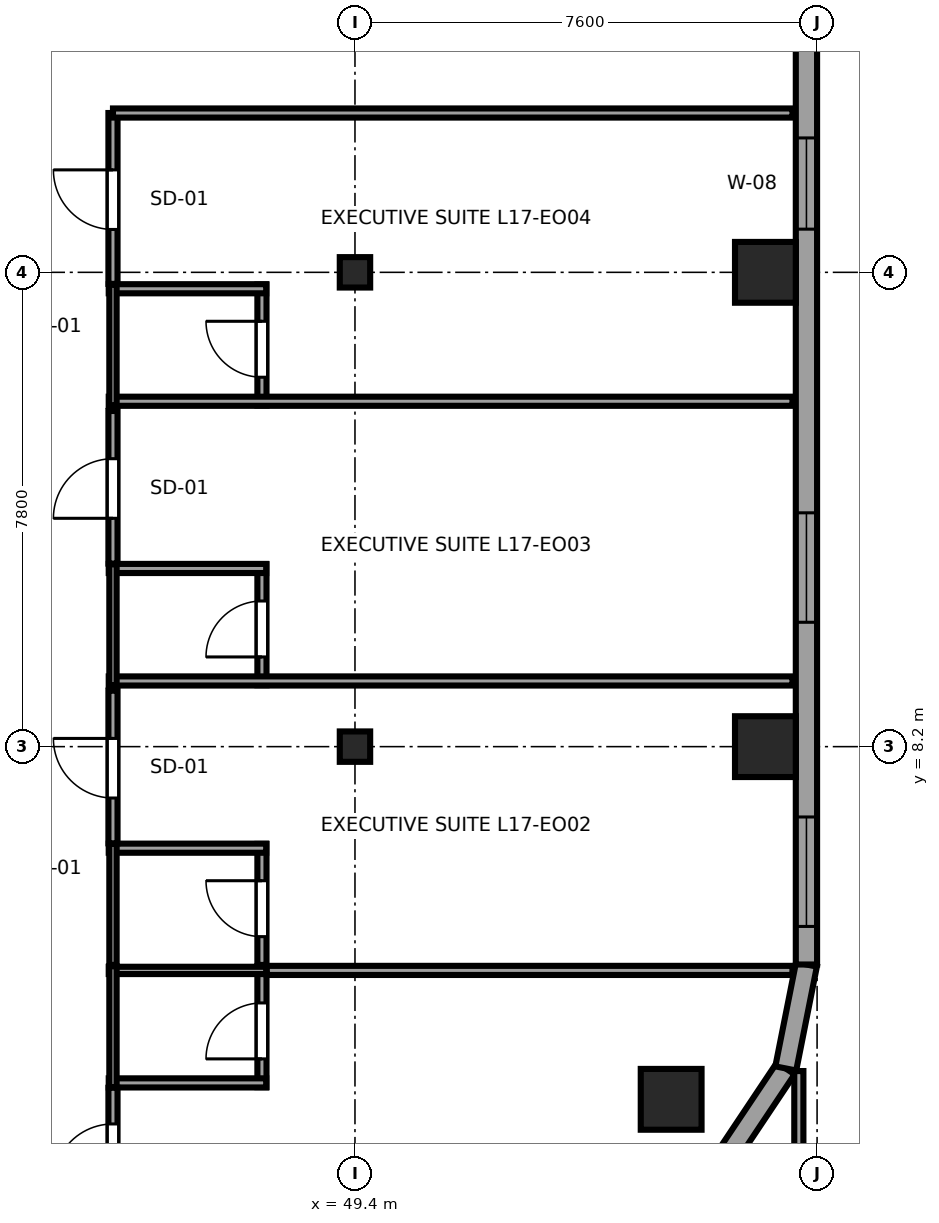
"""IFC4 building model, lengths in metres.
Left out: names, types, materials, properties, quantities, classifications, styles, units other than length and angle.
Written with IfcOpenShell. Run it as: python <this file> out.ifc"""

import sys

from ifc_helpers import new_model, si_unit, direction, frame, frame_2d, origin, origin_2d, place, context, subcontext, project, spatial, rectangle, i_section, extrude, source, transform, mapped, element, fill, save


model = new_model("IFC4")
c1 = context("Model", 3, precision=1e-05, world=origin(), true_north=direction((0.0, 1.0)))
c2 = subcontext(c1, "Body", "Model", "MODEL_VIEW")
j1 = project(units=[si_unit("LENGTHUNIT", "METRE"), si_unit("PLANEANGLEUNIT", "RADIAN")], contexts=[c1])
p1 = place(None, origin())
s1 = spatial("IfcSite", under=j1, at=p1, CompositionType="ELEMENT")
p2 = place(p1, origin())
s2 = spatial("IfcBuilding", under=s1, at=p2, CompositionType="ELEMENT")
p3 = place(p2, frame((0.0, 0.0, 71.05)))
s3 = spatial("IfcBuildingStorey", under=s2, at=p3, CompositionType="ELEMENT", Elevation=71.05)
m1 = source(origin(), c2, "Body", "SweptSolid", [
    extrude(i_section(OverallWidth=0.5, OverallDepth=0.5, WebThickness=0.028, FlangeThickness=0.045, at=origin_2d()), origin(), (0.0, 0.0, 1.0), 3.55),
])
for number, where, z_axis, x_axis in (
    (1, (49.4, 8.2, 0.0), (0.0, 0.0, 1.0), (1.0, 0.0, 0.0)),
    (2, (49.4, 16.0, 0.0), (0.0, 0.0, 1.0), (1.0, 0.0, 0.0)),
):
    element("IfcColumn", number, at=place(p3, frame(where, z_axis=z_axis, x_axis=x_axis)), inside=s3, PredefinedType="COLUMN", context=c2, shape_type="MappedRepresentation", body=[
        mapped(m1, transform((0.0, 0.0, 0.0), x_axis=(1.0, 0.0, 0.0), y_axis=(0.0, 1.0, 0.0), z_axis=(0.0, 0.0, 1.0), scale=1.0)),
    ])
m2 = source(origin(), c2, "Body", "SweptSolid", [
    extrude(rectangle(XDim=1.0, YDim=1.0, at=origin_2d()), origin(), (0.0, 0.0, 1.0), 3.55),
])
for number, where, z_axis, x_axis in (
    (3, (54.6, 2.4, 0.0), (0.0, 0.0, 1.0), (1.0, 0.0, 0.0)),
    (4, (56.15, 8.2, 0.0), (0.0, 0.0, 1.0), (1.0, 0.0, 0.0)),
    (5, (56.15, 16.0, 0.0), (0.0, 0.0, 1.0), (1.0, 0.0, 0.0)),
):
    element("IfcColumn", number, at=place(p3, frame(where, z_axis=z_axis, x_axis=x_axis)), inside=s3, PredefinedType="COLUMN", context=c2, shape_type="MappedRepresentation", body=[
        mapped(m2, transform((0.0, 0.0, 0.0), x_axis=(1.0, 0.0, 0.0), y_axis=(0.0, 1.0, 0.0), z_axis=(0.0, 0.0, 1.0), scale=1.0)),
    ])
p4 = place(p3, frame((55.527, 1.473, 0.0), z_axis=(0.0, 0.0, 1.0), x_axis=(0.55554893791, 0.831483840845, 0.0)))
e6 = element("IfcWall", 6, at=p4, inside=s3, PredefinedType="SOLIDWALL", context=c2, shape_type="SweptSolid", body=[
    extrude(rectangle(XDim=1.725, YDim=0.35, at=frame_2d((0.863, 0.0))), origin(), (0.0, 0.0, 1.0), 2.832),
])
p5 = place(p3, frame((56.485, 2.908, 0.0), z_axis=(0.0, 0.0, 1.0), x_axis=(0.195011420161, 0.980800971659, 0.0)))
e7 = element("IfcWall", 7, at=p5, inside=s3, PredefinedType="SOLIDWALL", context=c2, shape_type="SweptSolid", body=[
    extrude(rectangle(XDim=1.743, YDim=0.35, at=frame_2d((0.871, 0.0))), origin(), (0.0, 0.0, 1.0), 3.37),
])
p6 = place(p3, frame((56.825, 4.617, 0.0), z_axis=(0.0, 0.0, 1.0), x_axis=(0.0, 1.0, 0.0)))
e8 = element("IfcWall", 8, at=p6, inside=s3, PredefinedType="SOLIDWALL", context=c2, shape_type="SweptSolid", body=[
    extrude(rectangle(XDim=36.766, YDim=0.35, at=frame_2d((18.383, 0.0))), origin(), (0.0, 0.0, 1.0), 3.37),
])
p7 = place(p6, frame((0.626, 0.0, 0.68)))
e9 = element("IfcOpeningElement", 9, at=p7, cuts=e8, PredefinedType="OPENING", context=c2, shape_type="SweptSolid", body=[
    extrude(rectangle(XDim=1.8, YDim=1.85, at=frame_2d((0.9, 0.925))), frame((0.0, 0.185, 0.0), z_axis=(0.0, -1.0, 0.0), x_axis=(1.0, 0.0, 0.0)), (0.0, 0.0, 1.0), 0.37),
])
p8 = place(p6, frame((5.628, 0.0, 0.68)))
e10 = element("IfcOpeningElement", 10, at=p8, cuts=e8, PredefinedType="OPENING", context=c2, shape_type="SweptSolid", body=[
    extrude(rectangle(XDim=1.8, YDim=1.85, at=frame_2d((0.9, 0.925))), frame((0.0, 0.185, 0.0), z_axis=(0.0, -1.0, 0.0), x_axis=(1.0, 0.0, 0.0)), (0.0, 0.0, 1.0), 0.37),
])
p9 = place(p6, frame((16.933, 0.0, 0.68)))
e11 = element("IfcOpeningElement", 11, at=p9, cuts=e8, PredefinedType="OPENING", context=c2, shape_type="SweptSolid", body=[
    extrude(rectangle(XDim=1.8, YDim=1.85, at=frame_2d((0.9, 0.925))), frame((0.0, 0.185, 0.0), z_axis=(0.0, -1.0, 0.0), x_axis=(1.0, 0.0, 0.0)), (0.0, 0.0, 1.0), 0.37),
])
p10 = place(p6, frame((25.386, 0.0, 0.68)))
e12 = element("IfcOpeningElement", 12, at=p10, cuts=e8, PredefinedType="OPENING", context=c2, shape_type="SweptSolid", body=[
    extrude(rectangle(XDim=1.8, YDim=1.85, at=frame_2d((0.9, 0.925))), frame((0.0, 0.185, 0.0), z_axis=(0.0, -1.0, 0.0), x_axis=(1.0, 0.0, 0.0)), (0.0, 0.0, 1.0), 0.37),
])
p11 = place(p6, frame((30.388, 0.0, 0.68)))
e13 = element("IfcOpeningElement", 13, at=p11, cuts=e8, PredefinedType="OPENING", context=c2, shape_type="SweptSolid", body=[
    extrude(rectangle(XDim=1.8, YDim=1.85, at=frame_2d((0.9, 0.925))), frame((0.0, 0.185, 0.0), z_axis=(0.0, -1.0, 0.0), x_axis=(1.0, 0.0, 0.0)), (0.0, 0.0, 1.0), 0.37),
])
p12 = place(p6, frame((33.29, 0.0, 0.68)))
e14 = element("IfcOpeningElement", 14, at=p12, cuts=e8, PredefinedType="OPENING", context=c2, shape_type="SweptSolid", body=[
    extrude(rectangle(XDim=1.8, YDim=1.85, at=frame_2d((0.9, 0.925))), frame((0.0, 0.185, 0.0), z_axis=(0.0, -1.0, 0.0), x_axis=(1.0, 0.0, 0.0)), (0.0, 0.0, 1.0), 0.37),
])
p13 = place(p6, frame((12.093, 0.0, 0.62)))
e15 = element("IfcOpeningElement", 15, at=p13, cuts=e8, PredefinedType="OPENING", context=c2, shape_type="SweptSolid", body=[
    extrude(rectangle(XDim=1.5, YDim=1.55, at=frame_2d((0.75, 0.775))), frame((0.0, 0.185, 0.0), z_axis=(0.0, -1.0, 0.0), x_axis=(1.0, 0.0, 0.0)), (0.0, 0.0, 1.0), 0.37),
])
p14 = place(p3, frame((47.87, 2.6, 0.0), z_axis=(0.0, 0.0, 1.0), x_axis=(0.0, 1.0, 0.0)))
e16 = element("IfcWall", 16, at=p14, inside=s3, PredefinedType="PARTITIONING", context=c2, shape_type="SweptSolid", body=[
    extrude(rectangle(XDim=1.99, YDim=0.15, at=frame_2d((0.995, 0.0))), origin(), (0.0, 0.0, 1.0), 3.37),
])
p15 = place(p14, frame((0.465, 0.0, 0.0)))
e17 = element("IfcOpeningElement", 17, at=p15, cuts=e16, PredefinedType="OPENING", context=c2, shape_type="SweptSolid", body=[
    extrude(rectangle(XDim=0.92, YDim=2.01, at=frame_2d((0.46, 1.005))), frame((0.0, 0.085, 0.0), z_axis=(0.0, -1.0, 0.0), x_axis=(1.0, 0.0, 0.0)), (0.0, 0.0, 1.0), 0.17),
])
p16 = place(p3, frame((45.35, 2.67, 0.0), z_axis=(0.0, 0.0, 1.0), x_axis=(1.0, 0.0, 0.0)))
e18 = element("IfcWall", 18, at=p16, inside=s3, PredefinedType="PARTITIONING", context=c2, shape_type="SweptSolid", body=[
    extrude(rectangle(XDim=2.59, YDim=0.15, at=frame_2d((1.295, 0.0))), origin(), (0.0, 0.0, 1.0), 3.37),
])
p17 = place(p3, frame((45.35, 4.52, 0.0), z_axis=(0.0, 0.0, 1.0), x_axis=(1.0, 0.0, 0.0)))
e19 = element("IfcWall", 19, at=p17, inside=s3, PredefinedType="PLUMBINGWALL", context=c2, shape_type="SweptSolid", body=[
    extrude(rectangle(XDim=2.59, YDim=0.12, at=frame_2d((1.295, 0.0))), origin(), (0.0, 0.0, 1.0), 3.37),
])
p18 = place(p3, frame((45.42, 2.6, 0.0), z_axis=(0.0, 0.0, 1.0), x_axis=(0.0, 1.0, 0.0)))
e20 = element("IfcWall", 20, at=p18, inside=s3, PredefinedType="PLUMBINGWALL", context=c2, shape_type="SweptSolid", body=[
    extrude(rectangle(XDim=1.99, YDim=0.12, at=frame_2d((0.995, 0.0))), origin(), (0.0, 0.0, 1.0), 3.37),
])
p19 = place(p3, frame((47.87, 4.61, 0.0), z_axis=(0.0, 0.0, 1.0), x_axis=(0.0, 1.0, 0.0)))
e21 = element("IfcWall", 21, at=p19, inside=s3, PredefinedType="PARTITIONING", context=c2, shape_type="SweptSolid", body=[
    extrude(rectangle(XDim=1.99, YDim=0.15, at=frame_2d((0.995, 0.0))), origin(), (0.0, 0.0, 1.0), 3.37),
])
p20 = place(p19, frame((0.465, 0.0, 0.0)))
e22 = element("IfcOpeningElement", 22, at=p20, cuts=e21, PredefinedType="OPENING", context=c2, shape_type="SweptSolid", body=[
    extrude(rectangle(XDim=0.92, YDim=2.01, at=frame_2d((0.46, 1.005))), frame((0.0, 0.085, 0.0), z_axis=(0.0, -1.0, 0.0), x_axis=(1.0, 0.0, 0.0)), (0.0, 0.0, 1.0), 0.17),
])
p21 = place(p3, frame((45.35, 6.53, 0.0), z_axis=(0.0, 0.0, 1.0), x_axis=(1.0, 0.0, 0.0)))
e23 = element("IfcWall", 23, at=p21, inside=s3, PredefinedType="PARTITIONING", context=c2, shape_type="SweptSolid", body=[
    extrude(rectangle(XDim=2.59, YDim=0.15, at=frame_2d((1.295, 0.0))), origin(), (0.0, 0.0, 1.0), 3.37),
])
p22 = place(p3, frame((45.42, 4.61, 0.0), z_axis=(0.0, 0.0, 1.0), x_axis=(0.0, 1.0, 0.0)))
e24 = element("IfcWall", 24, at=p22, inside=s3, PredefinedType="PLUMBINGWALL", context=c2, shape_type="SweptSolid", body=[
    extrude(rectangle(XDim=1.99, YDim=0.12, at=frame_2d((0.995, 0.0))), origin(), (0.0, 0.0, 1.0), 3.37),
])
p23 = place(p3, frame((47.87, 9.21, 0.0), z_axis=(0.0, 0.0, 1.0), x_axis=(0.0, 1.0, 0.0)))
e25 = element("IfcWall", 25, at=p23, inside=s3, PredefinedType="PARTITIONING", context=c2, shape_type="SweptSolid", body=[
    extrude(rectangle(XDim=1.99, YDim=0.15, at=frame_2d((0.995, 0.0))), origin(), (0.0, 0.0, 1.0), 3.37),
])
p24 = place(p23, frame((0.465, 0.0, 0.0)))
e26 = element("IfcOpeningElement", 26, at=p24, cuts=e25, PredefinedType="OPENING", context=c2, shape_type="SweptSolid", body=[
    extrude(rectangle(XDim=0.92, YDim=2.01, at=frame_2d((0.46, 1.005))), frame((0.0, 0.085, 0.0), z_axis=(0.0, -1.0, 0.0), x_axis=(1.0, 0.0, 0.0)), (0.0, 0.0, 1.0), 0.17),
])
p25 = place(p3, frame((45.35, 9.28, 0.0), z_axis=(0.0, 0.0, 1.0), x_axis=(1.0, 0.0, 0.0)))
e27 = element("IfcWall", 27, at=p25, inside=s3, PredefinedType="PARTITIONING", context=c2, shape_type="SweptSolid", body=[
    extrude(rectangle(XDim=11.245, YDim=0.15, at=frame_2d((5.623, 0.0))), origin(), (0.0, 0.0, 1.0), 3.37),
])
p26 = place(p3, frame((45.35, 11.13, 0.0), z_axis=(0.0, 0.0, 1.0), x_axis=(1.0, 0.0, 0.0)))
e28 = element("IfcWall", 28, at=p26, inside=s3, PredefinedType="PARTITIONING", context=c2, shape_type="SweptSolid", body=[
    extrude(rectangle(XDim=2.59, YDim=0.15, at=frame_2d((1.295, 0.0))), origin(), (0.0, 0.0, 1.0), 3.37),
])
p27 = place(p3, frame((45.42, 9.21, 0.0), z_axis=(0.0, 0.0, 1.0), x_axis=(0.0, 1.0, 0.0)))
e29 = element("IfcWall", 29, at=p27, inside=s3, PredefinedType="PLUMBINGWALL", context=c2, shape_type="SweptSolid", body=[
    extrude(rectangle(XDim=1.99, YDim=0.12, at=frame_2d((0.995, 0.0))), origin(), (0.0, 0.0, 1.0), 3.37),
])
p28 = place(p3, frame((47.87, 13.81, 0.0), z_axis=(0.0, 0.0, 1.0), x_axis=(0.0, 1.0, 0.0)))
e30 = element("IfcWall", 30, at=p28, inside=s3, PredefinedType="PARTITIONING", context=c2, shape_type="SweptSolid", body=[
    extrude(rectangle(XDim=1.99, YDim=0.15, at=frame_2d((0.995, 0.0))), origin(), (0.0, 0.0, 1.0), 3.37),
])
p29 = place(p28, frame((0.465, 0.0, 0.0)))
e31 = element("IfcOpeningElement", 31, at=p29, cuts=e30, PredefinedType="OPENING", context=c2, shape_type="SweptSolid", body=[
    extrude(rectangle(XDim=0.92, YDim=2.01, at=frame_2d((0.46, 1.005))), frame((0.0, 0.085, 0.0), z_axis=(0.0, -1.0, 0.0), x_axis=(1.0, 0.0, 0.0)), (0.0, 0.0, 1.0), 0.17),
])
p30 = place(p3, frame((45.35, 13.88, 0.0), z_axis=(0.0, 0.0, 1.0), x_axis=(1.0, 0.0, 0.0)))
e32 = element("IfcWall", 32, at=p30, inside=s3, PredefinedType="PARTITIONING", context=c2, shape_type="SweptSolid", body=[
    extrude(rectangle(XDim=11.245, YDim=0.15, at=frame_2d((5.623, 0.0))), origin(), (0.0, 0.0, 1.0), 3.37),
])
p31 = place(p3, frame((45.35, 15.73, 0.0), z_axis=(0.0, 0.0, 1.0), x_axis=(1.0, 0.0, 0.0)))
e33 = element("IfcWall", 33, at=p31, inside=s3, PredefinedType="PARTITIONING", context=c2, shape_type="SweptSolid", body=[
    extrude(rectangle(XDim=2.59, YDim=0.15, at=frame_2d((1.295, 0.0))), origin(), (0.0, 0.0, 1.0), 3.37),
])
p32 = place(p3, frame((45.42, 13.81, 0.0), z_axis=(0.0, 0.0, 1.0), x_axis=(0.0, 1.0, 0.0)))
e34 = element("IfcWall", 34, at=p32, inside=s3, PredefinedType="PLUMBINGWALL", context=c2, shape_type="SweptSolid", body=[
    extrude(rectangle(XDim=1.99, YDim=0.12, at=frame_2d((0.995, 0.0))), origin(), (0.0, 0.0, 1.0), 3.37),
])
p33 = place(p3, frame((45.42, 0.405, 0.0), z_axis=(0.0, 0.0, 1.0), x_axis=(0.0, 1.0, 0.0)))
e35 = element("IfcWall", 35, at=p33, inside=s3, PredefinedType="PARTITIONING", context=c2, shape_type="SweptSolid", body=[
    extrude(rectangle(XDim=2.185, YDim=0.15, at=frame_2d((1.093, 0.0))), origin(), (0.0, 0.0, 1.0), 3.37),
])
p34 = place(p33, frame((0.61, 0.0, 0.0)))
e36 = element("IfcOpeningElement", 36, at=p34, cuts=e35, PredefinedType="OPENING", context=c2, shape_type="SweptSolid", body=[
    extrude(rectangle(XDim=0.98, YDim=2.12, at=frame_2d((0.49, 1.06))), frame((0.0, 0.085, 0.0), z_axis=(0.0, -1.0, 0.0), x_axis=(1.0, 0.0, 0.0)), (0.0, 0.0, 1.0), 0.17),
])
p35 = place(p3, frame((56.7, 0.48, 0.0), z_axis=(0.0, 0.0, 1.0), x_axis=(0.0, 1.0, 0.0)))
e37 = element("IfcWall", 37, at=p35, inside=s3, PredefinedType="PARTITIONING", context=c2, shape_type="SweptSolid", body=[
    extrude(rectangle(XDim=2.385, YDim=0.15, at=frame_2d((1.192, 0.0))), origin(), (0.0, 0.0, 1.0), 3.37),
])
p36 = place(p3, frame((47.95, 4.52, 0.0), z_axis=(0.0, 0.0, 1.0), x_axis=(1.0, 0.0, 0.0)))
e38 = element("IfcWall", 38, at=p36, inside=s3, PredefinedType="PARTITIONING", context=c2, shape_type="SweptSolid", body=[
    extrude(rectangle(XDim=8.645, YDim=0.15, at=frame_2d((4.323, 0.0))), origin(), (0.0, 0.0, 1.0), 3.37),
])
p37 = place(p3, frame((45.42, 6.61, 0.0), z_axis=(0.0, 0.0, 1.0), x_axis=(0.0, 1.0, 0.0)))
e39 = element("IfcWall", 39, at=p37, inside=s3, PredefinedType="PARTITIONING", context=c2, shape_type="SweptSolid", body=[
    extrude(rectangle(XDim=2.51, YDim=0.15, at=frame_2d((1.255, 0.0))), origin(), (0.0, 0.0, 1.0), 3.37),
])
p38 = place(p37, frame((0.745, 0.0, 0.0)))
e40 = element("IfcOpeningElement", 40, at=p38, cuts=e39, PredefinedType="OPENING", context=c2, shape_type="SweptSolid", body=[
    extrude(rectangle(XDim=0.98, YDim=2.12, at=frame_2d((0.49, 1.06))), frame((0.0, 0.085, 0.0), z_axis=(0.0, -1.0, 0.0), x_axis=(1.0, 0.0, 0.0)), (0.0, 0.0, 1.0), 0.17),
])
p39 = place(p3, frame((45.42, 11.21, 0.0), z_axis=(0.0, 0.0, 1.0), x_axis=(0.0, 1.0, 0.0)))
e41 = element("IfcWall", 41, at=p39, inside=s3, PredefinedType="PARTITIONING", context=c2, shape_type="SweptSolid", body=[
    extrude(rectangle(XDim=2.51, YDim=0.15, at=frame_2d((1.255, 0.0))), origin(), (0.0, 0.0, 1.0), 3.37),
])
p40 = place(p39, frame((0.745, 0.0, 0.0)))
e42 = element("IfcOpeningElement", 42, at=p40, cuts=e41, PredefinedType="OPENING", context=c2, shape_type="SweptSolid", body=[
    extrude(rectangle(XDim=0.98, YDim=2.12, at=frame_2d((0.49, 1.06))), frame((0.0, 0.085, 0.0), z_axis=(0.0, -1.0, 0.0), x_axis=(1.0, 0.0, 0.0)), (0.0, 0.0, 1.0), 0.17),
])
p41 = place(p3, frame((45.42, 15.81, 0.0), z_axis=(0.0, 0.0, 1.0), x_axis=(0.0, 1.0, 0.0)))
e43 = element("IfcWall", 43, at=p41, inside=s3, PredefinedType="PARTITIONING", context=c2, shape_type="SweptSolid", body=[
    extrude(rectangle(XDim=2.81, YDim=0.15, at=frame_2d((1.405, 0.0))), origin(), (0.0, 0.0, 1.0), 3.37),
])
p42 = place(p41, frame((0.895, 0.0, 0.0)))
e44 = element("IfcOpeningElement", 44, at=p42, cuts=e43, PredefinedType="OPENING", context=c2, shape_type="SweptSolid", body=[
    extrude(rectangle(XDim=0.98, YDim=2.12, at=frame_2d((0.49, 1.06))), frame((0.0, 0.085, 0.0), z_axis=(0.0, -1.0, 0.0), x_axis=(1.0, 0.0, 0.0)), (0.0, 0.0, 1.0), 0.17),
])
p43 = place(p3, frame((45.42, 18.62, 0.0), z_axis=(0.0, 0.0, 1.0), x_axis=(1.0, 0.0, 0.0)))
e45 = element("IfcWall", 45, at=p43, inside=s3, PredefinedType="PARTITIONING", context=c2, shape_type="SweptSolid", body=[
    extrude(rectangle(XDim=11.175, YDim=0.15, at=frame_2d((5.587, 0.0))), origin(), (0.0, 0.0, 1.0), 3.37),
])
m3 = source(origin(), c2, "Body", "SweptSolid", [
    extrude(rectangle(XDim=1.8, YDim=1.85, at=frame_2d((0.9, 0.925))), frame((0.0, 0.09, 0.0), z_axis=(0.0, -1.0, 0.0), x_axis=(1.0, 0.0, 0.0)), (0.0, 0.0, 1.0), 0.06),
])
p44 = place(p7, origin())
e46 = element("IfcWindow", 46, at=p44, inside=s3, PartitioningType="TRIPLE_PANEL_HORIZONTAL", PredefinedType="WINDOW", context=c2, shape_type="MappedRepresentation", body=[
    mapped(m3, transform((0.0, 0.0, 0.0), x_axis=(1.0, 0.0, 0.0), y_axis=(0.0, 1.0, 0.0), z_axis=(0.0, 0.0, 1.0), scale=1.0)),
])
fill(e9, e46)
p45 = place(p8, origin())
e47 = element("IfcWindow", 47, at=p45, inside=s3, PartitioningType="TRIPLE_PANEL_HORIZONTAL", PredefinedType="WINDOW", context=c2, shape_type="MappedRepresentation", body=[
    mapped(m3, transform((0.0, 0.0, 0.0), x_axis=(1.0, 0.0, 0.0), y_axis=(0.0, 1.0, 0.0), z_axis=(0.0, 0.0, 1.0), scale=1.0)),
])
fill(e10, e47)
m4 = source(origin(), c2, "Body", "SweptSolid", [
    extrude(rectangle(XDim=1.5, YDim=1.55, at=frame_2d((0.75, 0.775))), frame((0.0, 0.09, 0.0), z_axis=(0.0, -1.0, 0.0), x_axis=(1.0, 0.0, 0.0)), (0.0, 0.0, 1.0), 0.06),
])
p46 = place(p13, origin())
e48 = element("IfcWindow", 48, at=p46, inside=s3, PartitioningType="SINGLE_PANEL", PredefinedType="WINDOW", context=c2, shape_type="MappedRepresentation", body=[
    mapped(m4, transform((0.0, 0.0, 0.0), x_axis=(1.0, 0.0, 0.0), y_axis=(0.0, 1.0, 0.0), z_axis=(0.0, 0.0, 1.0), scale=1.0)),
])
fill(e15, e48)
m5 = source(origin(), c2, "Body", "SweptSolid", [
    extrude(rectangle(XDim=0.92, YDim=2.01, at=frame_2d((0.46, 1.005))), frame((0.0, 0.025, 0.0), z_axis=(0.0, -1.0, 0.0), x_axis=(1.0, 0.0, 0.0)), (0.0, 0.0, 1.0), 0.05),
])
p47 = place(p15, origin())
e49 = element("IfcDoor", 49, at=p47, inside=s3, OperationType="SINGLE_SWING_LEFT", PredefinedType="DOOR", context=c2, shape_type="MappedRepresentation", body=[
    mapped(m5, transform((0.0, 0.0, 0.0), x_axis=(1.0, 0.0, 0.0), y_axis=(0.0, 1.0, 0.0), z_axis=(0.0, 0.0, 1.0), scale=1.0)),
])
fill(e17, e49)
p48 = place(p20, origin())
e50 = element("IfcDoor", 50, at=p48, inside=s3, OperationType="SINGLE_SWING_RIGHT", PredefinedType="DOOR", context=c2, shape_type="MappedRepresentation", body=[
    mapped(m5, transform((0.0, 0.0, 0.0), x_axis=(1.0, 0.0, 0.0), y_axis=(0.0, 1.0, 0.0), z_axis=(0.0, 0.0, 1.0), scale=1.0)),
])
fill(e22, e50)
p49 = place(p24, origin())
e51 = element("IfcDoor", 51, at=p49, inside=s3, OperationType="SINGLE_SWING_LEFT", PredefinedType="DOOR", context=c2, shape_type="MappedRepresentation", body=[
    mapped(m5, transform((0.0, 0.0, 0.0), x_axis=(1.0, 0.0, 0.0), y_axis=(0.0, 1.0, 0.0), z_axis=(0.0, 0.0, 1.0), scale=1.0)),
])
fill(e26, e51)
p50 = place(p29, origin())
e52 = element("IfcDoor", 52, at=p50, inside=s3, OperationType="SINGLE_SWING_RIGHT", PredefinedType="DOOR", context=c2, shape_type="MappedRepresentation", body=[
    mapped(m5, transform((0.0, 0.0, 0.0), x_axis=(1.0, 0.0, 0.0), y_axis=(0.0, 1.0, 0.0), z_axis=(0.0, 0.0, 1.0), scale=1.0)),
])
fill(e31, e52)
m6 = source(origin(), c2, "Body", "SweptSolid", [
    extrude(rectangle(XDim=0.98, YDim=2.12, at=frame_2d((0.49, 1.06))), frame((0.0, 0.025, 0.0), z_axis=(0.0, -1.0, 0.0), x_axis=(1.0, 0.0, 0.0)), (0.0, 0.0, 1.0), 0.05),
])
p51 = place(p34, origin())
e53 = element("IfcDoor", 53, at=p51, inside=s3, OperationType="SINGLE_SWING_LEFT", PredefinedType="DOOR", context=c2, shape_type="MappedRepresentation", body=[
    mapped(m6, transform((0.0, 0.0, 0.0), x_axis=(1.0, 0.0, 0.0), y_axis=(0.0, 1.0, 0.0), z_axis=(0.0, 0.0, 1.0), scale=1.0)),
])
fill(e36, e53)
p52 = place(p38, origin())
e54 = element("IfcDoor", 54, at=p52, inside=s3, OperationType="SINGLE_SWING_RIGHT", PredefinedType="DOOR", context=c2, shape_type="MappedRepresentation", body=[
    mapped(m6, transform((0.0, 0.0, 0.0), x_axis=(1.0, 0.0, 0.0), y_axis=(0.0, 1.0, 0.0), z_axis=(0.0, 0.0, 1.0), scale=1.0)),
])
fill(e40, e54)
p53 = place(p40, origin())
e55 = element("IfcDoor", 55, at=p53, inside=s3, OperationType="SINGLE_SWING_LEFT", PredefinedType="DOOR", context=c2, shape_type="MappedRepresentation", body=[
    mapped(m6, transform((0.0, 0.0, 0.0), x_axis=(1.0, 0.0, 0.0), y_axis=(0.0, 1.0, 0.0), z_axis=(0.0, 0.0, 1.0), scale=1.0)),
])
fill(e42, e55)
p54 = place(p42, origin())
e56 = element("IfcDoor", 56, at=p54, inside=s3, OperationType="SINGLE_SWING_RIGHT", PredefinedType="DOOR", context=c2, shape_type="MappedRepresentation", body=[
    mapped(m6, transform((0.0, 0.0, 0.0), x_axis=(1.0, 0.0, 0.0), y_axis=(0.0, 1.0, 0.0), z_axis=(0.0, 0.0, 1.0), scale=1.0)),
])
fill(e44, e56)
save(model, sys.argv[1])
